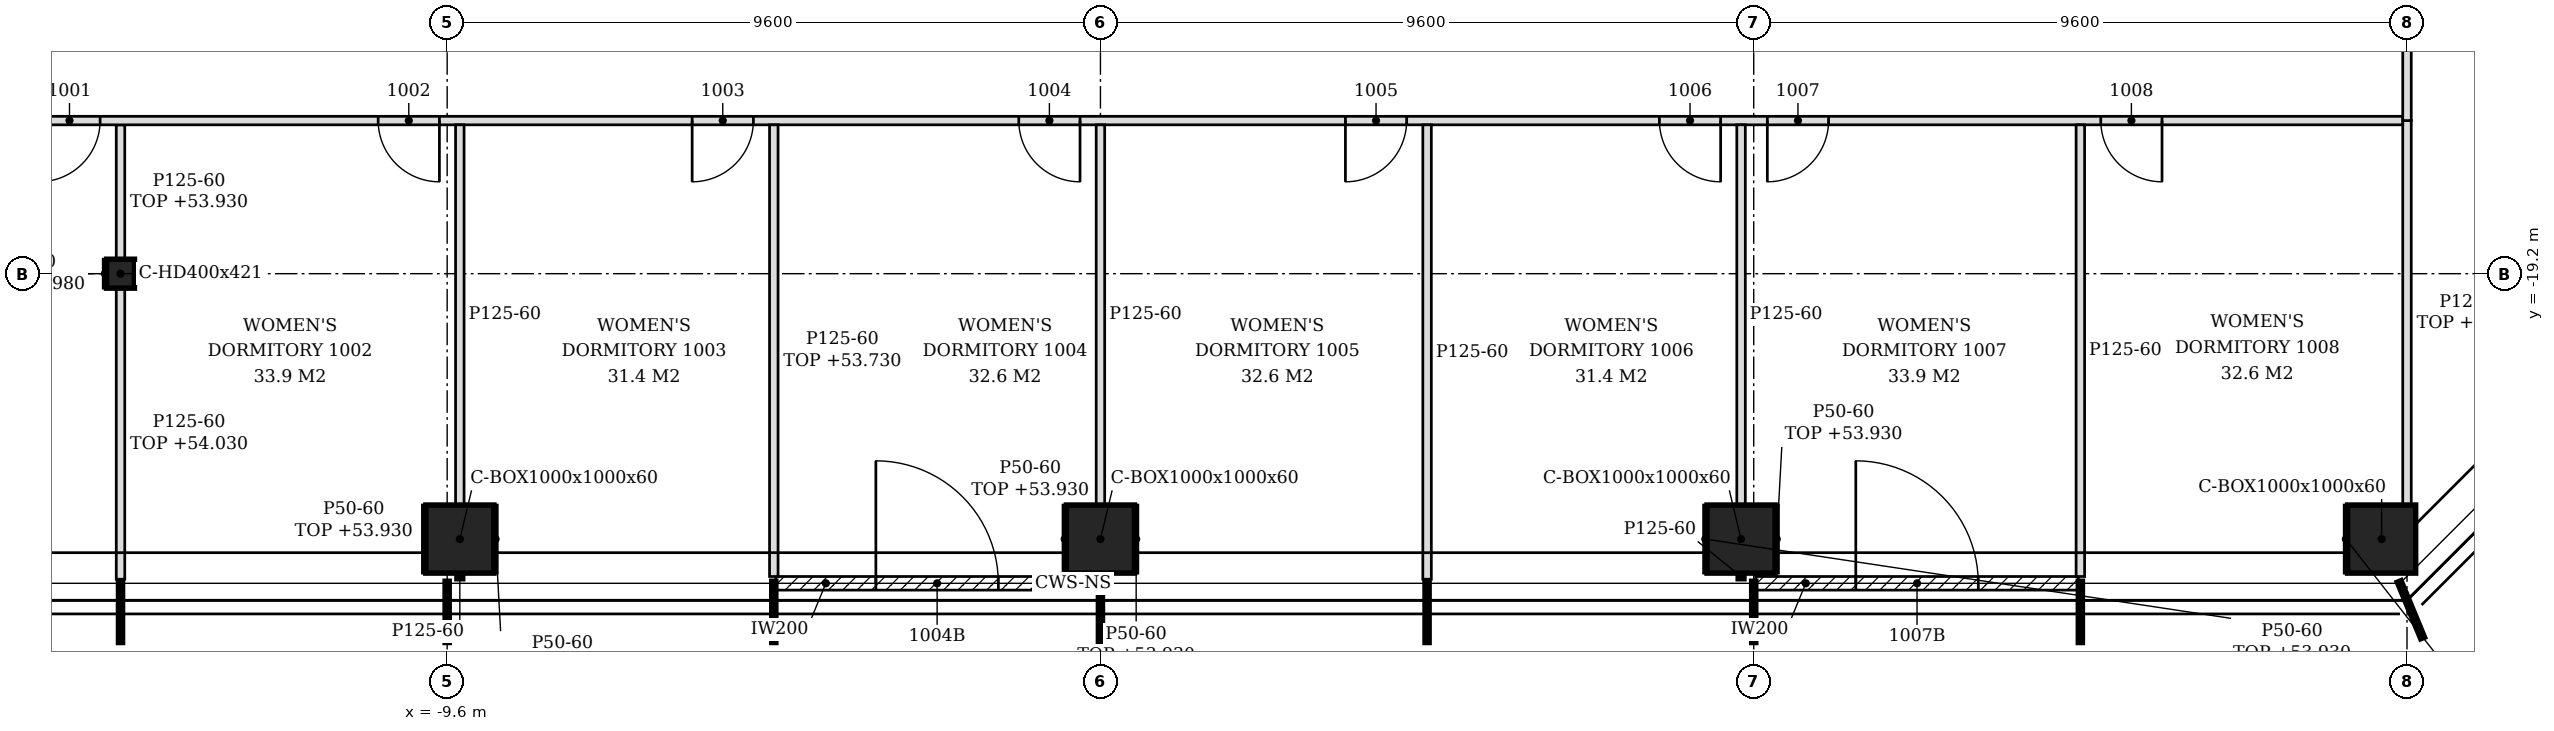
"""IFC4 building model, lengths in metres.
Left out: names, types, materials, properties, quantities, classifications, styles, units other than length and angle.
Written with IfcOpenShell. Run it as: python <this file> out.ifc"""

import sys

from ifc_helpers import new_model, si_unit, direction, frame, frame_2d, origin, origin_2d, place, context, subcontext, project, spatial, polyline, rectangle, hollow_rectangle, i_section, outline, extrude, element, fill, save


model = new_model("IFC4")
c1 = context("Model", 3, precision=1e-05, world=origin(), true_north=direction((0.0, 1.0)))
c2 = subcontext(c1, "Body", "Model", "MODEL_VIEW")
j1 = project(units=[si_unit("LENGTHUNIT", "METRE"), si_unit("PLANEANGLEUNIT", "RADIAN")], contexts=[c1])
p1 = place(None, origin())
s1 = spatial("IfcSite", under=j1, at=p1, CompositionType="ELEMENT")
p2 = place(p1, origin())
s2 = spatial("IfcBuilding", under=s1, at=p2, CompositionType="ELEMENT")
p3 = place(p2, frame((0.0, 0.0, 51.0)))
s3 = spatial("IfcBuildingStorey", under=s2, at=p3, CompositionType="ELEMENT", Elevation=51.0)
for number, where, z_axis, x_axis in (
    (1, (-9.414, -23.1, -0.15), (0.0, 0.0, 1.0), (1.0, 0.0, 0.0)),
    (2, (0.0, -23.1, -0.15), (0.0, 0.0, 1.0), (1.0, 0.0, 0.0)),
    (3, (9.414, -23.1, -0.15), (0.0, 0.0, 1.0), (1.0, 0.0, 0.0)),
    (4, (18.827, -23.1, -0.15), (0.0, 0.0, 1.0), (1.0, 0.0, 0.0)),
):
    element("IfcColumn", number, at=place(p3, frame(where, z_axis=z_axis, x_axis=x_axis)), inside=s3, PredefinedType="COLUMN", context=c2, shape_type="SweptSolid", body=[
        extrude(hollow_rectangle(XDim=1.0, YDim=1.0, WallThickness=0.06, at=origin_2d()), origin(), (0.0, 0.0, 1.0), 3.6),
    ])
p4 = place(p3, frame((-14.4, -19.2, -0.15), z_axis=(0.0, 0.0, 1.0), x_axis=(1.0, 0.0, 0.0)))
e5 = element("IfcColumn", 5, at=p4, inside=s3, PredefinedType="COLUMN", context=c2, shape_type="SweptSolid", body=[
    extrude(i_section(OverallWidth=0.409, OverallDepth=0.425, WebThickness=0.033, FlangeThickness=0.052, FilletRadius=0.015, at=origin_2d()), origin(), (0.0, 0.0, 1.0), 3.6),
])
p5 = place(p3, frame((-4.77, -23.75, 0.0), z_axis=(0.0, 0.0, 1.0), x_axis=(1.0, 0.0, 0.0)))
e6 = element("IfcWall", 6, at=p5, inside=s3, PredefinedType="NOTDEFINED", context=c2, shape_type="SweptSolid", body=[
    extrude(rectangle(XDim=4.74, YDim=0.2, at=frame_2d((2.37, 0.0))), origin(), (0.0, 0.0, 1.0), 3.45),
])
p6 = place(p5, frame((1.47, 0.0, 0.0)))
e7 = element("IfcOpeningElement", 7, at=p6, cuts=e6, PredefinedType="OPENING", context=c2, shape_type="SweptSolid", body=[
    extrude(rectangle(XDim=1.8, YDim=2.4, at=frame_2d((0.9, 1.2))), frame((0.0, 0.11, 0.0), z_axis=(0.0, -1.0, 0.0), x_axis=(1.0, 0.0, 0.0)), (0.0, 0.0, 1.0), 0.22),
])
p7 = place(p3, frame((9.63, -23.75, 0.0), z_axis=(0.0, 0.0, 1.0), x_axis=(1.0, 0.0, 0.0)))
e8 = element("IfcWall", 8, at=p7, inside=s3, PredefinedType="NOTDEFINED", context=c2, shape_type="SweptSolid", body=[
    extrude(rectangle(XDim=4.74, YDim=0.2, at=frame_2d((2.37, 0.0))), origin(), (0.0, 0.0, 1.0), 3.45),
])
p8 = place(p7, frame((1.47, 0.0, 0.0)))
e9 = element("IfcOpeningElement", 9, at=p8, cuts=e8, PredefinedType="OPENING", context=c2, shape_type="SweptSolid", body=[
    extrude(rectangle(XDim=1.8, YDim=2.4, at=frame_2d((0.9, 1.2))), frame((0.0, 0.11, 0.0), z_axis=(0.0, -1.0, 0.0), x_axis=(1.0, 0.0, 0.0)), (0.0, 0.0, 1.0), 0.22),
])
p9 = place(p3, frame((-14.4, -23.69, 0.0), z_axis=(0.0, 0.0, 1.0), x_axis=(0.0, 1.0, 0.0)))
e10 = element("IfcWall", 10, at=p9, inside=s3, PredefinedType="PARTITIONING", context=c2, shape_type="SweptSolid", body=[
    extrude(outline(polyline([(0.0, 0.0), (4.277, 0.0), (4.278, 3.03), (0.74, 3.03), (0.738, 2.93), (0.44, 2.93), (0.438, 3.03), (0.0, 3.03), (0.0, 0.0)])), frame((0.0, 0.062, 0.0), z_axis=(0.0, -1.0, 0.0), x_axis=(1.0, 0.0, 0.0)), (0.0, 0.0, 1.0), 0.125),
])
p10 = place(p3, frame((-9.414, -23.703, 0.0), z_axis=(0.0, 0.0, 1.0), x_axis=(0.0, 1.0, 0.0)))
e11 = element("IfcWall", 11, at=p10, inside=s3, PredefinedType="PARTITIONING", context=c2, shape_type="SweptSolid", body=[
    extrude(rectangle(XDim=0.103, YDim=0.125, at=frame_2d((0.051, 0.0))), origin(), (0.0, 0.0, 1.0), 3.45),
])
p11 = place(p3, frame((-4.8, -23.65, 0.0), z_axis=(0.0, 0.0, 1.0), x_axis=(0.0, 1.0, 0.0)))
e12 = element("IfcWall", 12, at=p11, inside=s3, PredefinedType="PARTITIONING", context=c2, shape_type="SweptSolid", body=[
    extrude(rectangle(XDim=6.637, YDim=0.125, at=frame_2d((3.319, 0.0))), origin(), (0.0, 0.0, 1.0), 2.73),
])
p12 = place(p3, frame((4.8, -23.69, 0.0), z_axis=(0.0, 0.0, 1.0), x_axis=(0.0, 1.0, 0.0)))
e13 = element("IfcWall", 13, at=p12, inside=s3, PredefinedType="PARTITIONING", context=c2, shape_type="SweptSolid", body=[
    extrude(outline(polyline([(0.0, 0.0), (6.677, 0.0), (6.677, 3.45), (4.595, 3.45), (4.593, 2.88), (4.385, 2.88), (4.383, 3.45), (0.74, 3.45), (0.738, 2.93), (0.44, 2.93), (0.438, 3.45), (0.0, 3.45), (0.0, 0.0)])), frame((0.0, 0.062, 0.0), z_axis=(0.0, -1.0, 0.0), x_axis=(1.0, 0.0, 0.0)), (0.0, 0.0, 1.0), 0.125),
])
p13 = place(p3, frame((9.414, -23.703, 0.0), z_axis=(0.0, 0.0, 1.0), x_axis=(0.0, 1.0, 0.0)))
e14 = element("IfcWall", 14, at=p13, inside=s3, PredefinedType="PARTITIONING", context=c2, shape_type="SweptSolid", body=[
    extrude(rectangle(XDim=0.103, YDim=0.125, at=frame_2d((0.051, 0.0))), origin(), (0.0, 0.0, 1.0), 3.45),
])
p14 = place(p3, frame((14.4, -23.65, 0.0), z_axis=(0.0, 0.0, 1.0), x_axis=(0.0, 1.0, 0.0)))
e15 = element("IfcWall", 15, at=p14, inside=s3, PredefinedType="PARTITIONING", context=c2, shape_type="SweptSolid", body=[
    extrude(outline(polyline([(0.0, 0.0), (6.637, 0.0), (6.637, 3.45), (4.555, 3.45), (4.553, 2.88), (4.345, 2.88), (4.343, 3.45), (0.7, 3.45), (0.698, 2.93), (0.4, 2.93), (0.398, 3.45), (0.0, 3.45), (0.0, 0.0)])), frame((0.0, 0.062, 0.0), z_axis=(0.0, -1.0, 0.0), x_axis=(1.0, 0.0, 0.0)), (0.0, 0.0, 1.0), 0.125),
])
p15 = place(p3, frame((-9.414, -22.6, 0.0), z_axis=(0.0, 0.0, 1.0), x_axis=(0.0, 1.0, 0.0)))
e16 = element("IfcWall", 16, at=p15, inside=s3, PredefinedType="PARTITIONING", context=c2, shape_type="SweptSolid", body=[
    extrude(outline(polyline([(0.0, 0.0), (5.588, 0.0), (5.587, 3.45), (3.5, 3.45), (3.498, 2.93), (3.3, 2.93), (3.298, 3.45), (0.0, 3.45), (0.0, 0.0)])), frame((0.0, 0.062, 0.0), z_axis=(0.0, -1.0, 0.0), x_axis=(1.0, 0.0, 0.0)), (0.0, 0.0, 1.0), 0.125),
])
for number, where, z_axis, x_axis in (
    (17, (0.0, -22.6, 0.0), (0.0, 0.0, 1.0), (0.0, 1.0, 0.0)),
    (18, (9.414, -22.6, 0.0), (0.0, 0.0, 1.0), (0.0, 1.0, 0.0)),
):
    element("IfcWall", number, at=place(p3, frame(where, z_axis=z_axis, x_axis=x_axis)), inside=s3, PredefinedType="PARTITIONING", context=c2, shape_type="SweptSolid", body=[
        extrude(outline(polyline([(0.0, 0.0), (5.588, 0.0), (5.587, 3.45), (3.505, 3.45), (3.503, 2.88), (3.295, 2.88), (3.293, 3.45), (0.0, 3.45), (0.0, 0.0)])), frame((0.0, 0.062, 0.0), z_axis=(0.0, -1.0, 0.0), x_axis=(1.0, 0.0, 0.0)), (0.0, 0.0, 1.0), 0.125),
    ])
p16 = place(p3, frame((19.2, -22.6, 0.0), z_axis=(0.0, 0.0, 1.0), x_axis=(0.0, 1.0, 0.0)))
e19 = element("IfcWall", 19, at=p16, inside=s3, PredefinedType="PARTITIONING", context=c2, shape_type="SweptSolid", body=[
    extrude(outline(polyline([(0.0, 0.0), (5.65, 0.0), (5.65, 2.73), (0.43, 2.73), (0.428, 2.63), (0.0, 2.63), (0.0, 0.0)])), frame((0.0, 0.062, 0.0), z_axis=(0.0, -1.0, 0.0), x_axis=(1.0, 0.0, 0.0)), (0.0, 0.0, 1.0), 0.125),
])
p17 = place(p3, frame((-14.4, -18.988, 0.0), z_axis=(0.0, 0.0, 1.0), x_axis=(0.0, 1.0, 0.0)))
e20 = element("IfcWall", 20, at=p17, inside=s3, PredefinedType="PARTITIONING", context=c2, shape_type="SweptSolid", body=[
    extrude(rectangle(XDim=1.975, YDim=0.125, at=frame_2d((0.988, 0.0))), origin(), (0.0, 0.0, 1.0), 2.93),
])
p18 = place(p3, frame((-21.35, -16.95, 0.0), z_axis=(0.0, 0.0, 1.0), x_axis=(1.0, 0.0, 0.0)))
e21 = element("IfcWall", 21, at=p18, inside=s3, PredefinedType="PARTITIONING", context=c2, shape_type="SweptSolid", body=[
    extrude(outline(polyline([(0.0, 0.0), (40.488, 0.0), (40.488, 2.73), (40.4, 2.73), (40.398, 3.45), (28.7, 3.45), (28.698, 2.73), (28.4, 2.73), (28.398, 3.45), (16.7, 3.45), (16.698, 2.73), (16.4, 2.73), (16.398, 3.45), (7.1, 3.45), (7.098, 2.93), (6.8, 2.93), (6.798, 3.45), (0.0, 3.45), (0.0, 0.0)])), frame((0.0, 0.062, 0.0), z_axis=(0.0, -1.0, 0.0), x_axis=(1.0, 0.0, 0.0)), (0.0, 0.0, 1.0), 0.125),
])
p19 = place(p18, frame((5.75, 0.0, 0.0)))
e22 = element("IfcOpeningElement", 22, at=p19, cuts=e21, PredefinedType="OPENING", context=c2, shape_type="SweptSolid", body=[
    extrude(rectangle(XDim=0.9, YDim=2.1, at=frame_2d((0.45, 1.05))), frame((0.0, 0.073, 0.0), z_axis=(0.0, -1.0, 0.0), x_axis=(1.0, 0.0, 0.0)), (0.0, 0.0, 1.0), 0.145),
])
p20 = place(p18, frame((10.736, 0.0, 0.0)))
e23 = element("IfcOpeningElement", 23, at=p20, cuts=e21, PredefinedType="OPENING", context=c2, shape_type="SweptSolid", body=[
    extrude(rectangle(XDim=0.9, YDim=2.1, at=frame_2d((0.45, 1.05))), frame((0.0, 0.073, 0.0), z_axis=(0.0, -1.0, 0.0), x_axis=(1.0, 0.0, 0.0)), (0.0, 0.0, 1.0), 0.145),
])
p21 = place(p18, frame((15.35, 0.0, 0.0)))
e24 = element("IfcOpeningElement", 24, at=p21, cuts=e21, PredefinedType="OPENING", context=c2, shape_type="SweptSolid", body=[
    extrude(rectangle(XDim=0.9, YDim=2.1, at=frame_2d((0.45, 1.05))), frame((0.0, 0.073, 0.0), z_axis=(0.0, -1.0, 0.0), x_axis=(1.0, 0.0, 0.0)), (0.0, 0.0, 1.0), 0.145),
])
p22 = place(p18, frame((20.15, 0.0, 0.0)))
e25 = element("IfcOpeningElement", 25, at=p22, cuts=e21, PredefinedType="OPENING", context=c2, shape_type="SweptSolid", body=[
    extrude(rectangle(XDim=0.9, YDim=2.1, at=frame_2d((0.45, 1.05))), frame((0.0, 0.073, 0.0), z_axis=(0.0, -1.0, 0.0), x_axis=(1.0, 0.0, 0.0)), (0.0, 0.0, 1.0), 0.145),
])
p23 = place(p18, frame((24.95, 0.0, 0.0)))
e26 = element("IfcOpeningElement", 26, at=p23, cuts=e21, PredefinedType="OPENING", context=c2, shape_type="SweptSolid", body=[
    extrude(rectangle(XDim=0.9, YDim=2.1, at=frame_2d((0.45, 1.05))), frame((0.0, 0.073, 0.0), z_axis=(0.0, -1.0, 0.0), x_axis=(1.0, 0.0, 0.0)), (0.0, 0.0, 1.0), 0.145),
])
p24 = place(p18, frame((29.564, 0.0, 0.0)))
e27 = element("IfcOpeningElement", 27, at=p24, cuts=e21, PredefinedType="OPENING", context=c2, shape_type="SweptSolid", body=[
    extrude(rectangle(XDim=0.9, YDim=2.1, at=frame_2d((0.45, 1.05))), frame((0.0, 0.073, 0.0), z_axis=(0.0, -1.0, 0.0), x_axis=(1.0, 0.0, 0.0)), (0.0, 0.0, 1.0), 0.145),
])
p25 = place(p18, frame((31.15, 0.0, 0.0)))
e28 = element("IfcOpeningElement", 28, at=p25, cuts=e21, PredefinedType="OPENING", context=c2, shape_type="SweptSolid", body=[
    extrude(rectangle(XDim=0.9, YDim=2.1, at=frame_2d((0.45, 1.05))), frame((0.0, 0.073, 0.0), z_axis=(0.0, -1.0, 0.0), x_axis=(1.0, 0.0, 0.0)), (0.0, 0.0, 1.0), 0.145),
])
p26 = place(p18, frame((36.05, 0.0, 0.0)))
e29 = element("IfcOpeningElement", 29, at=p26, cuts=e21, PredefinedType="OPENING", context=c2, shape_type="SweptSolid", body=[
    extrude(rectangle(XDim=0.9, YDim=2.1, at=frame_2d((0.45, 1.05))), frame((0.0, 0.073, 0.0), z_axis=(0.0, -1.0, 0.0), x_axis=(1.0, 0.0, 0.0)), (0.0, 0.0, 1.0), 0.145),
])
p27 = place(p3, frame((19.2, -16.95, 0.0), z_axis=(0.0, 0.0, 1.0), x_axis=(0.0, 1.0, 0.0)))
e30 = element("IfcWall", 30, at=p27, inside=s3, PredefinedType="PARTITIONING", context=c2, shape_type="SweptSolid", body=[
    extrude(rectangle(XDim=8.313, YDim=0.125, at=frame_2d((4.156, 0.0))), origin(), (0.0, 0.0, 1.0), 2.73),
])
p28 = place(p27, frame((6.15, 0.0, 0.0)))
e31 = element("IfcOpeningElement", 31, at=p28, cuts=e30, PredefinedType="OPENING", context=c2, shape_type="SweptSolid", body=[
    extrude(rectangle(XDim=0.9, YDim=2.1, at=frame_2d((0.45, 1.05))), frame((0.0, 0.073, 0.0), z_axis=(0.0, -1.0, 0.0), x_axis=(1.0, 0.0, 0.0)), (0.0, 0.0, 1.0), 0.145),
])
p29 = place(p3, frame((-14.629, -19.413, 0.0), z_axis=(0.0, 0.0, 1.0), x_axis=(0.0, 1.0, 0.0)))
e32 = element("IfcWall", 32, at=p29, inside=s3, PredefinedType="PARTITIONING", context=c2, shape_type="SweptSolid", body=[
    extrude(rectangle(XDim=0.425, YDim=0.05, at=frame_2d((0.212, 0.0))), origin(), (0.0, 0.0, 1.0), 2.98),
])
for number, where, z_axis, x_axis in (
    (33, (-9.939, -23.6, 0.0), (0.0, 0.0, 1.0), (0.0, 1.0, 0.0)),
    (34, (-8.889, -23.6, 0.0), (0.0, 0.0, 1.0), (0.0, 1.0, 0.0)),
    (35, (-0.525, -23.6, 0.0), (0.0, 0.0, 1.0), (0.0, 1.0, 0.0)),
    (36, (0.525, -23.6, 0.0), (0.0, 0.0, 1.0), (0.0, 1.0, 0.0)),
    (37, (8.889, -23.6, 0.0), (0.0, 0.0, 1.0), (0.0, 1.0, 0.0)),
    (38, (9.939, -23.6, 0.0), (0.0, 0.0, 1.0), (0.0, 1.0, 0.0)),
    (39, (18.302, -23.6, 0.0), (0.0, 0.0, 1.0), (0.0, 1.0, 0.0)),
):
    element("IfcWall", number, at=place(p3, frame(where, z_axis=z_axis, x_axis=x_axis)), inside=s3, PredefinedType="PARTITIONING", context=c2, shape_type="SweptSolid", body=[
        extrude(rectangle(XDim=1.0, YDim=0.05, at=frame_2d((0.5, 0.0))), origin(), (0.0, 0.0, 1.0), 2.93),
    ])
p30 = place(p6, origin())
e40 = element("IfcDoor", 40, at=p30, inside=s3, OperationType="SINGLE_SWING_LEFT", PredefinedType="DOOR", context=c2, shape_type="SweptSolid", body=[
    extrude(rectangle(XDim=1.8, YDim=2.4, at=frame_2d((0.9, 1.2))), frame((0.0, 0.025, 0.0), z_axis=(0.0, -1.0, 0.0), x_axis=(1.0, 0.0, 0.0)), (0.0, 0.0, 1.0), 0.05),
])
fill(e7, e40)
p31 = place(p8, origin())
e41 = element("IfcDoor", 41, at=p31, inside=s3, OperationType="SINGLE_SWING_LEFT", PredefinedType="DOOR", context=c2, shape_type="SweptSolid", body=[
    extrude(rectangle(XDim=1.8, YDim=2.4, at=frame_2d((0.9, 1.2))), frame((0.0, 0.025, 0.0), z_axis=(0.0, -1.0, 0.0), x_axis=(1.0, 0.0, 0.0)), (0.0, 0.0, 1.0), 0.05),
])
fill(e9, e41)
p32 = place(p19, frame((0.9, 0.0, 0.0), z_axis=(0.0, 0.0, 1.0), x_axis=(-1.0, 0.0, 0.0)))
e42 = element("IfcDoor", 42, at=p32, inside=s3, OperationType="SINGLE_SWING_RIGHT", PredefinedType="DOOR", context=c2, shape_type="SweptSolid", body=[
    extrude(rectangle(XDim=0.9, YDim=2.1, at=frame_2d((0.45, 1.05))), frame((0.0, 0.025, 0.0), z_axis=(0.0, -1.0, 0.0), x_axis=(1.0, 0.0, 0.0)), (0.0, 0.0, 1.0), 0.05),
])
fill(e22, e42)
p33 = place(p20, frame((0.9, 0.0, 0.0), z_axis=(0.0, 0.0, 1.0), x_axis=(-1.0, 0.0, 0.0)))
e43 = element("IfcDoor", 43, at=p33, inside=s3, OperationType="SINGLE_SWING_LEFT", PredefinedType="DOOR", context=c2, shape_type="SweptSolid", body=[
    extrude(rectangle(XDim=0.9, YDim=2.1, at=frame_2d((0.45, 1.05))), frame((0.0, 0.025, 0.0), z_axis=(0.0, -1.0, 0.0), x_axis=(1.0, 0.0, 0.0)), (0.0, 0.0, 1.0), 0.05),
])
fill(e23, e43)
p34 = place(p21, frame((0.9, 0.0, 0.0), z_axis=(0.0, 0.0, 1.0), x_axis=(-1.0, 0.0, 0.0)))
e44 = element("IfcDoor", 44, at=p34, inside=s3, OperationType="SINGLE_SWING_RIGHT", PredefinedType="DOOR", context=c2, shape_type="SweptSolid", body=[
    extrude(rectangle(XDim=0.9, YDim=2.1, at=frame_2d((0.45, 1.05))), frame((0.0, 0.025, 0.0), z_axis=(0.0, -1.0, 0.0), x_axis=(1.0, 0.0, 0.0)), (0.0, 0.0, 1.0), 0.05),
])
fill(e24, e44)
p35 = place(p22, frame((0.9, 0.0, 0.0), z_axis=(0.0, 0.0, 1.0), x_axis=(-1.0, 0.0, 0.0)))
e45 = element("IfcDoor", 45, at=p35, inside=s3, OperationType="SINGLE_SWING_LEFT", PredefinedType="DOOR", context=c2, shape_type="SweptSolid", body=[
    extrude(rectangle(XDim=0.9, YDim=2.1, at=frame_2d((0.45, 1.05))), frame((0.0, 0.025, 0.0), z_axis=(0.0, -1.0, 0.0), x_axis=(1.0, 0.0, 0.0)), (0.0, 0.0, 1.0), 0.05),
])
fill(e25, e45)
p36 = place(p23, frame((0.9, 0.0, 0.0), z_axis=(0.0, 0.0, 1.0), x_axis=(-1.0, 0.0, 0.0)))
e46 = element("IfcDoor", 46, at=p36, inside=s3, OperationType="SINGLE_SWING_RIGHT", PredefinedType="DOOR", context=c2, shape_type="SweptSolid", body=[
    extrude(rectangle(XDim=0.9, YDim=2.1, at=frame_2d((0.45, 1.05))), frame((0.0, 0.025, 0.0), z_axis=(0.0, -1.0, 0.0), x_axis=(1.0, 0.0, 0.0)), (0.0, 0.0, 1.0), 0.05),
])
fill(e26, e46)
p37 = place(p24, frame((0.9, 0.0, 0.0), z_axis=(0.0, 0.0, 1.0), x_axis=(-1.0, 0.0, 0.0)))
e47 = element("IfcDoor", 47, at=p37, inside=s3, OperationType="SINGLE_SWING_LEFT", PredefinedType="DOOR", context=c2, shape_type="SweptSolid", body=[
    extrude(rectangle(XDim=0.9, YDim=2.1, at=frame_2d((0.45, 1.05))), frame((0.0, 0.025, 0.0), z_axis=(0.0, -1.0, 0.0), x_axis=(1.0, 0.0, 0.0)), (0.0, 0.0, 1.0), 0.05),
])
fill(e27, e47)
p38 = place(p25, frame((0.9, 0.0, 0.0), z_axis=(0.0, 0.0, 1.0), x_axis=(-1.0, 0.0, 0.0)))
e48 = element("IfcDoor", 48, at=p38, inside=s3, OperationType="SINGLE_SWING_RIGHT", PredefinedType="DOOR", context=c2, shape_type="SweptSolid", body=[
    extrude(rectangle(XDim=0.9, YDim=2.1, at=frame_2d((0.45, 1.05))), frame((0.0, 0.025, 0.0), z_axis=(0.0, -1.0, 0.0), x_axis=(1.0, 0.0, 0.0)), (0.0, 0.0, 1.0), 0.05),
])
fill(e28, e48)
p39 = place(p26, frame((0.9, 0.0, 0.0), z_axis=(0.0, 0.0, 1.0), x_axis=(-1.0, 0.0, 0.0)))
e49 = element("IfcDoor", 49, at=p39, inside=s3, OperationType="SINGLE_SWING_LEFT", PredefinedType="DOOR", context=c2, shape_type="SweptSolid", body=[
    extrude(rectangle(XDim=0.9, YDim=2.1, at=frame_2d((0.45, 1.05))), frame((0.0, 0.025, 0.0), z_axis=(0.0, -1.0, 0.0), x_axis=(1.0, 0.0, 0.0)), (0.0, 0.0, 1.0), 0.05),
])
fill(e29, e49)
save(model, sys.argv[1])
